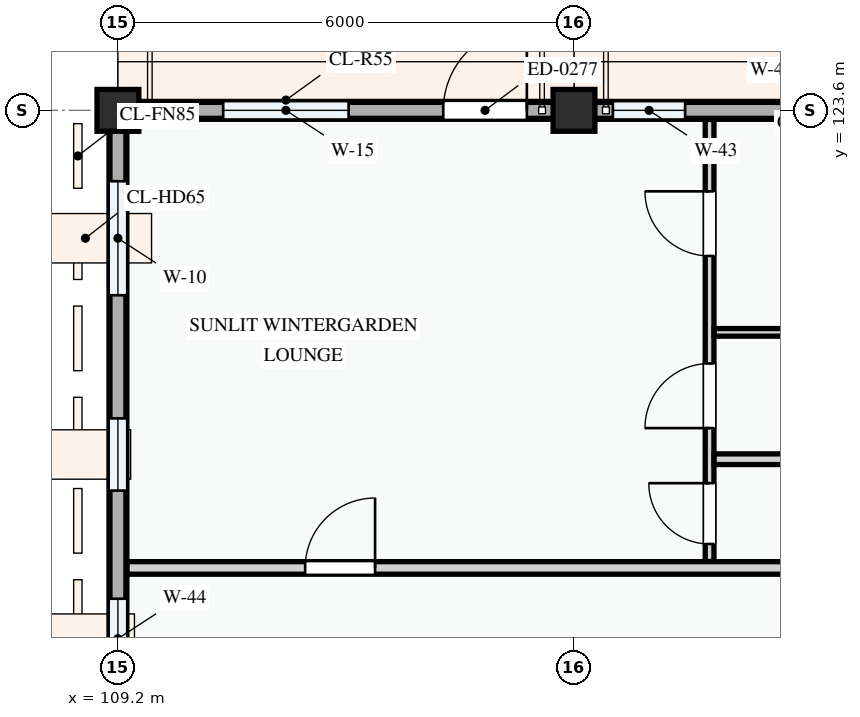
"""IFC4 building model, lengths in metres.
Left out: names, types, materials, properties, quantities, classifications, styles, units other than length and angle.
Written with IfcOpenShell. Run it as: python <this file> out.ifc"""

import sys

from ifc_helpers import new_model, si_unit, direction, frame, frame_2d, origin, origin_2d, place, context, subcontext, project, spatial, polyline, rectangle, outline, extrude, element, fill, save


model = new_model("IFC4")
c1 = context("Model", 3, precision=1e-05, world=origin(), true_north=direction((0.0, 1.0)))
c2 = subcontext(c1, "Body", "Model", "MODEL_VIEW")
j1 = project(units=[si_unit("LENGTHUNIT", "METRE"), si_unit("PLANEANGLEUNIT", "RADIAN")], contexts=[c1])
p1 = place(None, origin())
s1 = spatial("IfcSite", under=j1, at=p1, CompositionType="ELEMENT")
p2 = place(p1, origin())
s2 = spatial("IfcBuilding", under=s1, at=p2, CompositionType="ELEMENT")
p3 = place(p2, frame((0.0, 0.0, 41.1)))
s3 = spatial("IfcBuildingStorey", under=s2, at=p3, CompositionType="ELEMENT", Elevation=41.1)
for number, where, z_axis, x_axis in (
    (1, (109.2, 123.6, 0.0), (0.0, 0.0, 1.0), (1.0, 0.0, 0.0)),
    (2, (115.2, 123.6, 0.0), (0.0, 0.0, 1.0), (1.0, 0.0, 0.0)),
):
    element("IfcColumn", number, at=place(p3, frame(where, z_axis=z_axis, x_axis=x_axis)), inside=s3, PredefinedType="COLUMN", context=c2, shape_type="SweptSolid", body=[
        extrude(rectangle(XDim=0.55, YDim=0.55, at=origin_2d()), origin(), (0.0, 0.0, 1.0), 3.3),
    ])
p4 = place(p3, frame((123.6, 123.6, 0.0), z_axis=(0.0, 0.0, 1.0), x_axis=(-1.0, 0.0, 0.0)))
e3 = element("IfcWall", 3, at=p4, inside=s3, PredefinedType="STANDARD", context=c2, shape_type="SweptSolid", body=[
    extrude(rectangle(XDim=8.4, YDim=0.235, at=frame_2d((4.2, 0.0))), origin(), (0.0, 0.0, 1.0), 2.345),
])
p5 = place(p4, frame((2.12, 0.0, 0.0)))
e4 = element("IfcOpeningElement", 4, at=p5, cuts=e3, PredefinedType="OPENING", context=c2, shape_type="SweptSolid", body=[
    extrude(rectangle(XDim=1.05, YDim=2.15, at=frame_2d((0.525, 1.075))), frame((0.0, 0.127, 0.0), z_axis=(0.0, -1.0, 0.0), x_axis=(1.0, 0.0, 0.0)), (0.0, 0.0, 1.0), 0.255),
])
p6 = place(p4, frame((0.49, 0.0, 0.78)))
e5 = element("IfcOpeningElement", 5, at=p6, cuts=e3, PredefinedType="OPENING", context=c2, shape_type="SweptSolid", body=[
    extrude(rectangle(XDim=1.0, YDim=1.25, at=frame_2d((0.5, 0.625))), frame((0.0, 0.127, 0.0), z_axis=(0.0, -1.0, 0.0), x_axis=(1.0, 0.0, 0.0)), (0.0, 0.0, 1.0), 0.255),
])
p7 = place(p4, frame((4.343, 0.0, 0.78)))
e6 = element("IfcOpeningElement", 6, at=p7, cuts=e3, PredefinedType="OPENING", context=c2, shape_type="SweptSolid", body=[
    extrude(rectangle(XDim=1.15, YDim=1.25, at=frame_2d((0.575, 0.625))), frame((0.0, 0.127, 0.0), z_axis=(0.0, -1.0, 0.0), x_axis=(1.0, 0.0, 0.0)), (0.0, 0.0, 1.0), 0.255),
])
p8 = place(p4, frame((6.938, 0.0, 0.78)))
e7 = element("IfcOpeningElement", 7, at=p8, cuts=e3, PredefinedType="OPENING", context=c2, shape_type="SweptSolid", body=[
    extrude(rectangle(XDim=0.95, YDim=1.15, at=frame_2d((0.475, 0.575))), frame((0.0, 0.127, 0.0), z_axis=(0.0, -1.0, 0.0), x_axis=(1.0, 0.0, 0.0)), (0.0, 0.0, 1.0), 0.255),
])
p9 = place(p3, frame((115.2, 123.6, 0.0), z_axis=(0.0, 0.0, 1.0), x_axis=(-1.0, 0.0, 0.0)))
e8 = element("IfcWall", 8, at=p9, inside=s3, PredefinedType="STANDARD", context=c2, shape_type="SweptSolid", body=[
    extrude(rectangle(XDim=6.0, YDim=0.235, at=frame_2d((3.0, 0.0))), origin(), (0.0, 0.0, 1.0), 2.445),
])
p10 = place(p9, frame((0.62, 0.0, 0.0)))
e9 = element("IfcOpeningElement", 9, at=p10, cuts=e8, PredefinedType="OPENING", context=c2, shape_type="SweptSolid", body=[
    extrude(rectangle(XDim=1.1, YDim=2.15, at=frame_2d((0.55, 1.075))), frame((0.0, 0.127, 0.0), z_axis=(0.0, -1.0, 0.0), x_axis=(1.0, 0.0, 0.0)), (0.0, 0.0, 1.0), 0.255),
])
p11 = place(p9, frame((2.965, 0.0, 0.78)))
e10 = element("IfcOpeningElement", 10, at=p11, cuts=e8, PredefinedType="OPENING", context=c2, shape_type="SweptSolid", body=[
    extrude(rectangle(XDim=1.65, YDim=1.5, at=frame_2d((0.825, 0.75))), frame((0.0, 0.127, 0.0), z_axis=(0.0, -1.0, 0.0), x_axis=(1.0, 0.0, 0.0)), (0.0, 0.0, 1.0), 0.255),
])
p12 = place(p3, frame((109.2, 123.6, 0.0), z_axis=(0.0, 0.0, 1.0), x_axis=(0.0, -1.0, 0.0)))
e11 = element("IfcWall", 11, at=p12, inside=s3, PredefinedType="STANDARD", context=c2, shape_type="SweptSolid", body=[
    extrude(rectangle(XDim=8.4, YDim=0.235, at=frame_2d((4.2, 0.0))), origin(), (0.0, 0.0, 1.0), 2.425),
])
p13 = place(p12, frame((0.933, 0.0, 0.78)))
e12 = element("IfcOpeningElement", 12, at=p13, cuts=e11, PredefinedType="OPENING", context=c2, shape_type="SweptSolid", body=[
    extrude(rectangle(XDim=1.5, YDim=1.5, at=frame_2d((0.75, 0.75))), frame((0.0, 0.127, 0.0), z_axis=(0.0, -1.0, 0.0), x_axis=(1.0, 0.0, 0.0)), (0.0, 0.0, 1.0), 0.255),
])
p14 = place(p12, frame((4.052, 0.0, 0.78)))
e13 = element("IfcOpeningElement", 13, at=p14, cuts=e11, PredefinedType="OPENING", context=c2, shape_type="SweptSolid", body=[
    extrude(rectangle(XDim=0.95, YDim=1.15, at=frame_2d((0.475, 0.575))), frame((0.0, 0.127, 0.0), z_axis=(0.0, -1.0, 0.0), x_axis=(1.0, 0.0, 0.0)), (0.0, 0.0, 1.0), 0.255),
])
p15 = place(p12, frame((6.425, 0.0, 0.78)))
e14 = element("IfcOpeningElement", 14, at=p15, cuts=e11, PredefinedType="OPENING", context=c2, shape_type="SweptSolid", body=[
    extrude(rectangle(XDim=1.05, YDim=1.2, at=frame_2d((0.525, 0.6))), frame((0.0, 0.127, 0.0), z_axis=(0.0, -1.0, 0.0), x_axis=(1.0, 0.0, 0.0)), (0.0, 0.0, 1.0), 0.255),
])
p16 = place(p3, frame((123.6, 123.6, 3.3), z_axis=(0.0, 0.0, 1.0), x_axis=(-1.0, 0.0, 0.0)))
e15 = element("IfcWall", 15, at=p16, inside=s3, PredefinedType="PARAPET", context=c2, shape_type="SweptSolid", body=[
    extrude(outline(polyline([(0.0, 0.0), (8.4, 0.0), (8.4, 1.12), (7.7, 1.322), (7.0, 1.485), (6.3, 1.618), (5.6, 1.718), (4.9, 1.779), (4.2, 1.8), (3.5, 1.779), (2.8, 1.718), (2.1, 1.618), (1.4, 1.485), (0.7, 1.322), (0.0, 1.12), (0.0, 0.0)])), frame((0.0, 0.105, 0.0), z_axis=(0.0, -1.0, 0.0), x_axis=(1.0, 0.0, 0.0)), (0.0, 0.0, 1.0), 0.21),
])
p17 = place(p3, frame((115.2, 123.6, 3.3), z_axis=(0.0, 0.0, 1.0), x_axis=(-1.0, 0.0, 0.0)))
e16 = element("IfcWall", 16, at=p17, inside=s3, PredefinedType="PARAPET", context=c2, shape_type="SweptSolid", body=[
    extrude(outline(polyline([(0.0, 0.0), (6.0, 0.0), (6.0, 1.12), (5.5, 1.322), (5.0, 1.485), (4.5, 1.618), (4.0, 1.718), (3.5, 1.779), (3.0, 1.8), (2.5, 1.779), (2.0, 1.718), (1.5, 1.618), (1.0, 1.485), (0.5, 1.322), (0.0, 1.12), (0.0, 0.0)])), frame((0.0, 0.105, 0.0), z_axis=(0.0, -1.0, 0.0), x_axis=(1.0, 0.0, 0.0)), (0.0, 0.0, 1.0), 0.21),
])
p18 = place(p3, frame((109.2, 123.6, 3.3), z_axis=(0.0, 0.0, 1.0), x_axis=(0.0, -1.0, 0.0)))
e17 = element("IfcWall", 17, at=p18, inside=s3, PredefinedType="PARAPET", context=c2, shape_type="SweptSolid", body=[
    extrude(rectangle(XDim=14.4, YDim=0.21, at=frame_2d((7.2, 0.0))), origin(), (0.0, 0.0, 1.0), 1.15),
])
p19 = place(p3, frame((116.984, 117.665, 0.0), z_axis=(0.0, 0.0, 1.0), x_axis=(0.0, 1.0, 0.0)))
e18 = element("IfcWall", 18, at=p19, inside=s3, PredefinedType="PARTITIONING", context=c2, shape_type="SweptSolid", body=[
    extrude(rectangle(XDim=5.816, YDim=0.115, at=frame_2d((2.908, 0.0))), origin(), (0.0, 0.0, 1.0), 3.0),
])
p20 = place(p19, frame((0.231, 0.0, 0.0)))
e19 = element("IfcOpeningElement", 19, at=p20, cuts=e18, PredefinedType="OPENING", context=c2, shape_type="SweptSolid", body=[
    extrude(rectangle(XDim=0.8, YDim=2.1, at=frame_2d((0.4, 1.05))), frame((0.0, 0.067, 0.0), z_axis=(0.0, -1.0, 0.0), x_axis=(1.0, 0.0, 0.0)), (0.0, 0.0, 1.0), 0.135),
])
p21 = place(p19, frame((1.755, 0.0, 0.0)))
e20 = element("IfcOpeningElement", 20, at=p21, cuts=e18, PredefinedType="OPENING", context=c2, shape_type="SweptSolid", body=[
    extrude(rectangle(XDim=0.85, YDim=2.1, at=frame_2d((0.425, 1.05))), frame((0.0, 0.067, 0.0), z_axis=(0.0, -1.0, 0.0), x_axis=(1.0, 0.0, 0.0)), (0.0, 0.0, 1.0), 0.135),
])
p22 = place(p19, frame((4.02, 0.0, 0.0)))
e21 = element("IfcOpeningElement", 21, at=p22, cuts=e18, PredefinedType="OPENING", context=c2, shape_type="SweptSolid", body=[
    extrude(rectangle(XDim=0.85, YDim=2.1, at=frame_2d((0.425, 1.05))), frame((0.0, 0.067, 0.0), z_axis=(0.0, -1.0, 0.0), x_axis=(1.0, 0.0, 0.0)), (0.0, 0.0, 1.0), 0.135),
])
p23 = place(p3, frame((117.043, 120.679, 0.0), z_axis=(0.0, 0.0, 1.0), x_axis=(1.0, 0.0, 0.0)))
e22 = element("IfcWall", 22, at=p23, inside=s3, PredefinedType="PARTITIONING", context=c2, shape_type="SweptSolid", body=[
    extrude(rectangle(XDim=4.672, YDim=0.1, at=frame_2d((2.336, 0.0))), origin(), (0.0, 0.0, 1.0), 3.0),
])
p24 = place(p3, frame((117.043, 119.01, 0.0), z_axis=(0.0, 0.0, 1.0), x_axis=(1.0, 0.0, 0.0)))
e23 = element("IfcWall", 23, at=p24, inside=s3, PredefinedType="PARTITIONING", context=c2, shape_type="SweptSolid", body=[
    extrude(rectangle(XDim=4.672, YDim=0.14, at=frame_2d((2.336, 0.0))), origin(), (0.0, 0.0, 1.0), 3.0),
])
p25 = place(p3, frame((109.32, 117.58, 0.0), z_axis=(0.0, 0.0, 1.0), x_axis=(1.0, 0.0, 0.0)))
e24 = element("IfcWall", 24, at=p25, inside=s3, PredefinedType="PARTITIONING", context=c2, shape_type="SweptSolid", body=[
    extrude(rectangle(XDim=43.22, YDim=0.165, at=frame_2d((21.61, 0.0))), origin(), (0.0, 0.0, 1.0), 3.0),
])
p26 = place(p25, frame((2.344, 0.0, 0.0)))
e25 = element("IfcOpeningElement", 25, at=p26, cuts=e24, PredefinedType="OPENING", context=c2, shape_type="SweptSolid", body=[
    extrude(rectangle(XDim=0.92, YDim=2.1, at=frame_2d((0.46, 1.05))), frame((0.0, 0.093, 0.0), z_axis=(0.0, -1.0, 0.0), x_axis=(1.0, 0.0, 0.0)), (0.0, 0.0, 1.0), 0.185),
])
p27 = place(p25, frame((16.856, 0.0, 0.0)))
e26 = element("IfcOpeningElement", 26, at=p27, cuts=e24, PredefinedType="OPENING", context=c2, shape_type="SweptSolid", body=[
    extrude(rectangle(XDim=0.92, YDim=2.1, at=frame_2d((0.46, 1.05))), frame((0.0, 0.093, 0.0), z_axis=(0.0, -1.0, 0.0), x_axis=(1.0, 0.0, 0.0)), (0.0, 0.0, 1.0), 0.185),
])
p28 = place(p25, frame((31.227, 0.0, 0.0)))
e27 = element("IfcOpeningElement", 27, at=p28, cuts=e24, PredefinedType="OPENING", context=c2, shape_type="SweptSolid", body=[
    extrude(rectangle(XDim=0.92, YDim=2.1, at=frame_2d((0.46, 1.05))), frame((0.0, 0.093, 0.0), z_axis=(0.0, -1.0, 0.0), x_axis=(1.0, 0.0, 0.0)), (0.0, 0.0, 1.0), 0.185),
])
p29 = place(p8, origin())
e28 = element("IfcWindow", 28, at=p29, inside=s3, PartitioningType="SINGLE_PANEL", PredefinedType="WINDOW", context=c2, shape_type="SweptSolid", body=[
    extrude(rectangle(XDim=0.95, YDim=1.15, at=frame_2d((0.475, 0.575))), frame((0.0, 0.03, 0.0), z_axis=(0.0, -1.0, 0.0), x_axis=(1.0, 0.0, 0.0)), (0.0, 0.0, 1.0), 0.06),
])
fill(e7, e28)
p30 = place(p10, frame((1.1, 0.0, 0.0), z_axis=(0.0, 0.0, 1.0), x_axis=(-1.0, 0.0, 0.0)))
e29 = element("IfcDoor", 29, at=p30, inside=s3, OperationType="SINGLE_SWING_RIGHT", PredefinedType="DOOR", context=c2, shape_type="SweptSolid", body=[
    extrude(rectangle(XDim=1.1, YDim=2.15, at=frame_2d((0.55, 1.075))), frame((0.0, 0.025, 0.0), z_axis=(0.0, -1.0, 0.0), x_axis=(1.0, 0.0, 0.0)), (0.0, 0.0, 1.0), 0.05),
])
fill(e9, e29)
p31 = place(p11, origin())
e30 = element("IfcWindow", 30, at=p31, inside=s3, PartitioningType="DOUBLE_PANEL_VERTICAL", PredefinedType="WINDOW", context=c2, shape_type="SweptSolid", body=[
    extrude(rectangle(XDim=1.65, YDim=1.5, at=frame_2d((0.825, 0.75))), frame((0.0, 0.03, 0.0), z_axis=(0.0, -1.0, 0.0), x_axis=(1.0, 0.0, 0.0)), (0.0, 0.0, 1.0), 0.06),
])
fill(e10, e30)
p32 = place(p13, origin())
e31 = element("IfcWindow", 31, at=p32, inside=s3, PartitioningType="SINGLE_PANEL", PredefinedType="WINDOW", context=c2, shape_type="SweptSolid", body=[
    extrude(rectangle(XDim=1.5, YDim=1.5, at=frame_2d((0.75, 0.75))), frame((0.0, 0.03, 0.0), z_axis=(0.0, -1.0, 0.0), x_axis=(1.0, 0.0, 0.0)), (0.0, 0.0, 1.0), 0.06),
])
fill(e12, e31)
p33 = place(p14, origin())
e32 = element("IfcWindow", 32, at=p33, inside=s3, PartitioningType="SINGLE_PANEL", PredefinedType="WINDOW", context=c2, shape_type="SweptSolid", body=[
    extrude(rectangle(XDim=0.95, YDim=1.15, at=frame_2d((0.475, 0.575))), frame((0.0, 0.03, 0.0), z_axis=(0.0, -1.0, 0.0), x_axis=(1.0, 0.0, 0.0)), (0.0, 0.0, 1.0), 0.06),
])
fill(e13, e32)
p34 = place(p15, origin())
e33 = element("IfcWindow", 33, at=p34, inside=s3, PartitioningType="SINGLE_PANEL", PredefinedType="WINDOW", context=c2, shape_type="SweptSolid", body=[
    extrude(rectangle(XDim=1.05, YDim=1.2, at=frame_2d((0.525, 0.6))), frame((0.0, 0.03, 0.0), z_axis=(0.0, -1.0, 0.0), x_axis=(1.0, 0.0, 0.0)), (0.0, 0.0, 1.0), 0.06),
])
fill(e14, e33)
p35 = place(p20, origin())
e34 = element("IfcDoor", 34, at=p35, inside=s3, OperationType="SINGLE_SWING_RIGHT", PredefinedType="DOOR", context=c2, shape_type="SweptSolid", body=[
    extrude(rectangle(XDim=0.8, YDim=2.1, at=frame_2d((0.4, 1.05))), frame((0.0, 0.025, 0.0), z_axis=(0.0, -1.0, 0.0), x_axis=(1.0, 0.0, 0.0)), (0.0, 0.0, 1.0), 0.05),
])
fill(e19, e34)
p36 = place(p21, origin())
e35 = element("IfcDoor", 35, at=p36, inside=s3, OperationType="SINGLE_SWING_LEFT", PredefinedType="DOOR", context=c2, shape_type="SweptSolid", body=[
    extrude(rectangle(XDim=0.85, YDim=2.1, at=frame_2d((0.425, 1.05))), frame((0.0, 0.025, 0.0), z_axis=(0.0, -1.0, 0.0), x_axis=(1.0, 0.0, 0.0)), (0.0, 0.0, 1.0), 0.05),
])
fill(e20, e35)
p37 = place(p22, origin())
e36 = element("IfcDoor", 36, at=p37, inside=s3, OperationType="SINGLE_SWING_RIGHT", PredefinedType="DOOR", context=c2, shape_type="SweptSolid", body=[
    extrude(rectangle(XDim=0.85, YDim=2.1, at=frame_2d((0.425, 1.05))), frame((0.0, 0.025, 0.0), z_axis=(0.0, -1.0, 0.0), x_axis=(1.0, 0.0, 0.0)), (0.0, 0.0, 1.0), 0.05),
])
fill(e21, e36)
p38 = place(p26, origin())
e37 = element("IfcDoor", 37, at=p38, inside=s3, OperationType="SINGLE_SWING_RIGHT", PredefinedType="DOOR", context=c2, shape_type="SweptSolid", body=[
    extrude(rectangle(XDim=0.92, YDim=2.1, at=frame_2d((0.46, 1.05))), frame((0.0, 0.025, 0.0), z_axis=(0.0, -1.0, 0.0), x_axis=(1.0, 0.0, 0.0)), (0.0, 0.0, 1.0), 0.05),
])
fill(e25, e37)
save(model, sys.argv[1])
